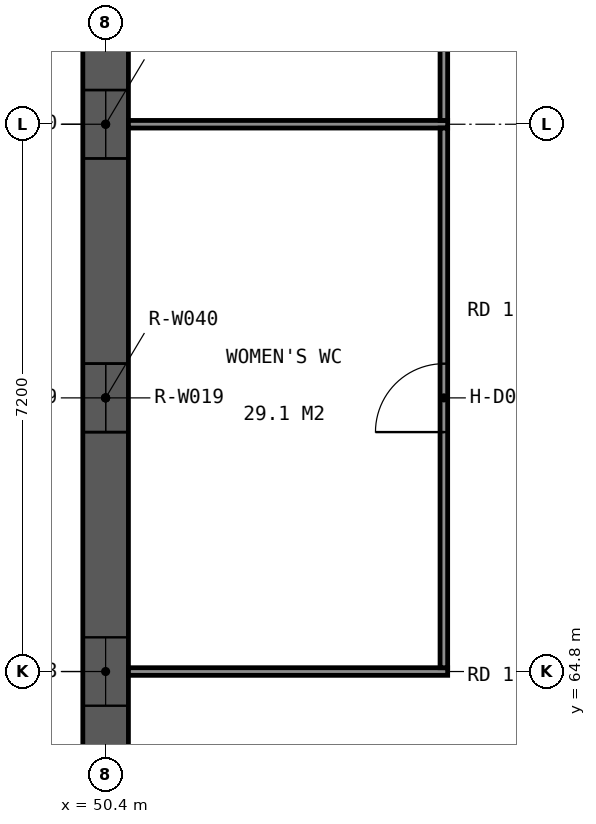
"""IFC4 building model, lengths in metres.
Left out: names, types, materials, properties, quantities, classifications, styles, units other than length and angle.
Written with IfcOpenShell. Run it as: python <this file> out.ifc"""

import sys

from ifc_helpers import new_model, si_unit, direction, frame, frame_2d, origin, place, context, subcontext, project, spatial, polyline, rectangle, outline, extrude, element, fill, save


model = new_model("IFC4")
c1 = context("Model", 3, precision=1e-05, world=origin(), true_north=direction((0.0, 1.0)))
c2 = subcontext(c1, "Body", "Model", "MODEL_VIEW")
j1 = project(units=[si_unit("LENGTHUNIT", "METRE"), si_unit("PLANEANGLEUNIT", "RADIAN")], contexts=[c1])
p1 = place(None, origin())
s1 = spatial("IfcSite", under=j1, at=p1, CompositionType="ELEMENT")
p2 = place(p1, origin())
s2 = spatial("IfcBuilding", under=s1, at=p2, CompositionType="ELEMENT")
p3 = place(p2, frame((0.0, 0.0, 9.6)))
s3 = spatial("IfcBuildingStorey", under=s2, at=p3, CompositionType="ELEMENT", Elevation=9.6)
p4 = place(p3, frame((50.4, 52.2, 0.0), z_axis=(0.0, 0.0, 1.0), x_axis=(0.0, 1.0, 0.0)))
e1 = element("IfcWall", 1, at=p4, inside=s3, PredefinedType="SOLIDWALL", context=c2, shape_type="SweptSolid", body=[
    extrude(outline(polyline([(0.0, 0.0), (54.0, 0.0), (54.0, 6.409), (53.7, 6.509), (53.4, 6.609), (53.1, 6.709), (52.8, 6.809), (52.5, 6.909), (52.2, 7.009), (51.9, 7.109), (51.6, 7.209), (51.3, 7.309), (51.0, 7.409), (50.764, 7.488), (50.762, 7.489), (50.7, 7.509), (50.4, 7.609), (50.1, 7.709), (49.8, 7.809), (49.5, 7.909), (49.2, 8.009), (48.9, 8.109), (48.6, 8.209), (48.3, 8.309), (48.0, 8.409), (47.7, 8.509), (47.4, 8.609), (47.1, 8.709), (46.8, 8.809), (46.5, 8.909), (46.2, 9.009), (46.027, 9.067), (46.025, 9.068), (45.964, 9.088), (45.962, 9.3), (45.9, 9.32), (45.6, 9.42), (45.3, 9.52), (45.0, 9.62), (44.7, 9.72), (44.4, 9.82), (44.1, 9.92), (43.8, 10.02), (43.5, 10.12), (43.2, 10.22), (42.9, 10.32), (42.6, 10.42), (42.3, 10.52), (42.0, 10.62), (41.7, 10.72), (41.4, 10.82), (41.227, 10.878), (41.225, 10.878), (41.1, 10.92), (40.8, 11.02), (40.5, 11.12), (40.2, 11.22), (39.9, 11.32), (39.6, 11.42), (39.3, 11.52), (39.0, 11.62), (38.7, 11.72), (38.4, 11.82), (38.1, 11.92), (37.8, 12.02), (37.5, 12.12), (37.2, 12.22), (36.9, 12.32), (36.6, 12.42), (36.49, 12.457), (36.488, 12.458), (36.427, 12.478), (36.425, 12.689), (36.3, 12.731), (36.0, 12.831), (35.7, 12.931), (35.4, 13.031), (35.1, 13.131), (34.8, 13.231), (34.5, 13.331), (34.2, 13.431), (33.9, 13.531), (33.6, 13.631), (33.3, 13.731), (33.0, 13.831), (32.7, 13.931), (32.4, 14.031), (32.1, 14.131), (31.8, 14.231), (31.69, 14.268), (31.688, 14.268), (31.5, 14.331), (31.2, 14.431), (30.9, 14.531), (30.6, 14.631), (30.3, 14.731), (30.0, 14.831), (29.7, 14.931), (29.4, 15.031), (29.1, 15.131), (28.8, 15.231), (28.5, 15.331), (28.2, 15.431), (27.9, 15.531), (27.6, 15.631), (27.3, 15.731), (27.201, 15.764), (27.199, 15.764), (27.0, 15.764), (26.801, 15.764), (26.799, 15.764), (26.7, 15.731), (26.4, 15.631), (26.1, 15.531), (25.8, 15.431), (25.5, 15.331), (25.2, 15.231), (24.9, 15.131), (24.6, 15.031), (24.3, 14.931), (24.0, 14.831), (23.7, 14.731), (23.4, 14.631), (23.1, 14.531), (22.8, 14.431), (22.5, 14.331), (22.312, 14.268), (22.31, 14.268), (22.2, 14.231), (21.9, 14.131), (21.6, 14.031), (21.3, 13.931), (21.0, 13.831), (20.7, 13.731), (20.4, 13.631), (20.1, 13.531), (19.8, 13.431), (19.5, 13.331), (19.2, 13.231), (18.9, 13.131), (18.6, 13.031), (18.3, 12.931), (18.0, 12.831), (17.7, 12.731), (17.575, 12.689), (17.573, 12.478), (17.512, 12.458), (17.51, 12.457), (17.4, 12.42), (17.1, 12.32), (16.8, 12.22), (16.5, 12.12), (16.2, 12.02), (15.9, 11.92), (15.6, 11.82), (15.3, 11.72), (15.0, 11.62), (14.7, 11.52), (14.4, 11.42), (14.1, 11.32), (13.8, 11.22), (13.5, 11.12), (13.2, 11.02), (12.9, 10.92), (12.775, 10.878), (12.773, 10.878), (12.6, 10.82), (12.3, 10.72), (12.0, 10.62), (11.7, 10.52), (11.4, 10.42), (11.1, 10.32), (10.8, 10.22), (10.5, 10.12), (10.2, 10.02), (9.9, 9.92), (9.6, 9.82), (9.3, 9.72), (9.0, 9.62), (8.7, 9.52), (8.4, 9.42), (8.1, 9.32), (8.038, 9.3), (8.036, 9.088), (7.975, 9.068), (7.973, 9.067), (7.8, 9.009), (7.5, 8.909), (7.2, 8.809), (6.9, 8.709), (6.6, 8.609), (6.3, 8.509), (6.0, 8.409), (5.7, 8.309), (5.4, 8.209), (5.1, 8.109), (4.8, 8.009), (4.5, 7.909), (4.2, 7.809), (3.9, 7.709), (3.6, 7.609), (3.3, 7.509), (3.238, 7.489), (3.236, 7.488), (3.0, 7.409), (2.7, 7.309), (2.4, 7.209), (2.1, 7.109), (1.8, 7.009), (1.5, 6.909), (1.2, 6.809), (0.9, 6.709), (0.6, 6.609), (0.3, 6.509), (0.0, 6.409), (0.0, 0.0)])), frame((0.0, 0.3, 0.0), z_axis=(0.0, -1.0, 0.0), x_axis=(1.0, 0.0, 0.0)), (0.0, 0.0, 1.0), 0.6),
])
p5 = place(p4, frame((1.35, 0.0, 0.9)))
e2 = element("IfcOpeningElement", 2, at=p5, cuts=e1, PredefinedType="OPENING", context=c2, shape_type="SweptSolid", body=[
    extrude(rectangle(XDim=0.9, YDim=3.3, at=frame_2d((0.45, 1.65))), frame((0.0, 0.31, 0.0), z_axis=(0.0, -1.0, 0.0), x_axis=(1.0, 0.0, 0.0)), (0.0, 0.0, 1.0), 0.62),
])
p6 = place(p4, frame((8.55, 0.0, 0.9)))
e3 = element("IfcOpeningElement", 3, at=p6, cuts=e1, PredefinedType="OPENING", context=c2, shape_type="SweptSolid", body=[
    extrude(rectangle(XDim=0.9, YDim=3.3, at=frame_2d((0.45, 1.65))), frame((0.0, 0.31, 0.0), z_axis=(0.0, -1.0, 0.0), x_axis=(1.0, 0.0, 0.0)), (0.0, 0.0, 1.0), 0.62),
])
p7 = place(p4, frame((15.75, 0.0, 0.9)))
e4 = element("IfcOpeningElement", 4, at=p7, cuts=e1, PredefinedType="OPENING", context=c2, shape_type="SweptSolid", body=[
    extrude(rectangle(XDim=0.9, YDim=3.3, at=frame_2d((0.45, 1.65))), frame((0.0, 0.31, 0.0), z_axis=(0.0, -1.0, 0.0), x_axis=(1.0, 0.0, 0.0)), (0.0, 0.0, 1.0), 0.62),
])
p8 = place(p4, frame((22.95, 0.0, 0.9)))
e5 = element("IfcOpeningElement", 5, at=p8, cuts=e1, PredefinedType="OPENING", context=c2, shape_type="SweptSolid", body=[
    extrude(rectangle(XDim=0.9, YDim=3.3, at=frame_2d((0.45, 1.65))), frame((0.0, 0.31, 0.0), z_axis=(0.0, -1.0, 0.0), x_axis=(1.0, 0.0, 0.0)), (0.0, 0.0, 1.0), 0.62),
])
p9 = place(p4, frame((30.15, 0.0, 0.9)))
e6 = element("IfcOpeningElement", 6, at=p9, cuts=e1, PredefinedType="OPENING", context=c2, shape_type="SweptSolid", body=[
    extrude(rectangle(XDim=0.9, YDim=3.3, at=frame_2d((0.45, 1.65))), frame((0.0, 0.31, 0.0), z_axis=(0.0, -1.0, 0.0), x_axis=(1.0, 0.0, 0.0)), (0.0, 0.0, 1.0), 0.62),
])
p10 = place(p4, frame((37.35, 0.0, 0.9)))
e7 = element("IfcOpeningElement", 7, at=p10, cuts=e1, PredefinedType="OPENING", context=c2, shape_type="SweptSolid", body=[
    extrude(rectangle(XDim=0.9, YDim=3.3, at=frame_2d((0.45, 1.65))), frame((0.0, 0.31, 0.0), z_axis=(0.0, -1.0, 0.0), x_axis=(1.0, 0.0, 0.0)), (0.0, 0.0, 1.0), 0.62),
])
p11 = place(p4, frame((44.55, 0.0, 0.9)))
e8 = element("IfcOpeningElement", 8, at=p11, cuts=e1, PredefinedType="OPENING", context=c2, shape_type="SweptSolid", body=[
    extrude(rectangle(XDim=0.9, YDim=3.3, at=frame_2d((0.45, 1.65))), frame((0.0, 0.31, 0.0), z_axis=(0.0, -1.0, 0.0), x_axis=(1.0, 0.0, 0.0)), (0.0, 0.0, 1.0), 0.62),
])
p12 = place(p4, frame((51.75, 0.0, 0.9)))
e9 = element("IfcOpeningElement", 9, at=p12, cuts=e1, PredefinedType="OPENING", context=c2, shape_type="SweptSolid", body=[
    extrude(rectangle(XDim=0.9, YDim=3.3, at=frame_2d((0.45, 1.65))), frame((0.0, 0.31, 0.0), z_axis=(0.0, -1.0, 0.0), x_axis=(1.0, 0.0, 0.0)), (0.0, 0.0, 1.0), 0.62),
])
p13 = place(p4, frame((1.35, 0.0, 4.8)))
e10 = element("IfcOpeningElement", 10, at=p13, cuts=e1, PredefinedType="OPENING", context=c2, shape_type="SweptSolid", body=[
    extrude(rectangle(XDim=0.9, YDim=1.5, at=frame_2d((0.45, 0.75))), frame((0.0, 0.31, 0.0), z_axis=(0.0, -1.0, 0.0), x_axis=(1.0, 0.0, 0.0)), (0.0, 0.0, 1.0), 0.62),
])
p14 = place(p4, frame((4.95, 0.0, 4.8)))
e11 = element("IfcOpeningElement", 11, at=p14, cuts=e1, PredefinedType="OPENING", context=c2, shape_type="SweptSolid", body=[
    extrude(rectangle(XDim=0.9, YDim=2.4, at=frame_2d((0.45, 1.2))), frame((0.0, 0.31, 0.0), z_axis=(0.0, -1.0, 0.0), x_axis=(1.0, 0.0, 0.0)), (0.0, 0.0, 1.0), 0.62),
])
p15 = place(p4, frame((8.55, 0.0, 4.8)))
e12 = element("IfcOpeningElement", 12, at=p15, cuts=e1, PredefinedType="OPENING", context=c2, shape_type="SweptSolid", body=[
    extrude(rectangle(XDim=0.9, YDim=3.3, at=frame_2d((0.45, 1.65))), frame((0.0, 0.31, 0.0), z_axis=(0.0, -1.0, 0.0), x_axis=(1.0, 0.0, 0.0)), (0.0, 0.0, 1.0), 0.62),
])
p16 = place(p4, frame((12.15, 0.0, 4.8)))
e13 = element("IfcOpeningElement", 13, at=p16, cuts=e1, PredefinedType="OPENING", context=c2, shape_type="SweptSolid", body=[
    extrude(rectangle(XDim=0.9, YDim=4.2, at=frame_2d((0.45, 2.1))), frame((0.0, 0.31, 0.0), z_axis=(0.0, -1.0, 0.0), x_axis=(1.0, 0.0, 0.0)), (0.0, 0.0, 1.0), 0.62),
])
p17 = place(p4, frame((15.75, 0.0, 4.8)))
e14 = element("IfcOpeningElement", 14, at=p17, cuts=e1, PredefinedType="OPENING", context=c2, shape_type="SweptSolid", body=[
    extrude(rectangle(XDim=0.9, YDim=4.2, at=frame_2d((0.45, 2.1))), frame((0.0, 0.31, 0.0), z_axis=(0.0, -1.0, 0.0), x_axis=(1.0, 0.0, 0.0)), (0.0, 0.0, 1.0), 0.62),
])
p18 = place(p4, frame((19.35, 0.0, 4.8)))
e15 = element("IfcOpeningElement", 15, at=p18, cuts=e1, PredefinedType="OPENING", context=c2, shape_type="SweptSolid", body=[
    extrude(rectangle(XDim=0.9, YDim=4.2, at=frame_2d((0.45, 2.1))), frame((0.0, 0.31, 0.0), z_axis=(0.0, -1.0, 0.0), x_axis=(1.0, 0.0, 0.0)), (0.0, 0.0, 1.0), 0.62),
])
p19 = place(p4, frame((22.95, 0.0, 4.8)))
e16 = element("IfcOpeningElement", 16, at=p19, cuts=e1, PredefinedType="OPENING", context=c2, shape_type="SweptSolid", body=[
    extrude(rectangle(XDim=0.9, YDim=4.2, at=frame_2d((0.45, 2.1))), frame((0.0, 0.31, 0.0), z_axis=(0.0, -1.0, 0.0), x_axis=(1.0, 0.0, 0.0)), (0.0, 0.0, 1.0), 0.62),
])
p20 = place(p4, frame((26.55, 0.0, 4.8)))
e17 = element("IfcOpeningElement", 17, at=p20, cuts=e1, PredefinedType="OPENING", context=c2, shape_type="SweptSolid", body=[
    extrude(rectangle(XDim=0.9, YDim=4.2, at=frame_2d((0.45, 2.1))), frame((0.0, 0.31, 0.0), z_axis=(0.0, -1.0, 0.0), x_axis=(1.0, 0.0, 0.0)), (0.0, 0.0, 1.0), 0.62),
])
p21 = place(p4, frame((30.15, 0.0, 4.8)))
e18 = element("IfcOpeningElement", 18, at=p21, cuts=e1, PredefinedType="OPENING", context=c2, shape_type="SweptSolid", body=[
    extrude(rectangle(XDim=0.9, YDim=4.2, at=frame_2d((0.45, 2.1))), frame((0.0, 0.31, 0.0), z_axis=(0.0, -1.0, 0.0), x_axis=(1.0, 0.0, 0.0)), (0.0, 0.0, 1.0), 0.62),
])
p22 = place(p4, frame((33.75, 0.0, 4.8)))
e19 = element("IfcOpeningElement", 19, at=p22, cuts=e1, PredefinedType="OPENING", context=c2, shape_type="SweptSolid", body=[
    extrude(rectangle(XDim=0.9, YDim=4.2, at=frame_2d((0.45, 2.1))), frame((0.0, 0.31, 0.0), z_axis=(0.0, -1.0, 0.0), x_axis=(1.0, 0.0, 0.0)), (0.0, 0.0, 1.0), 0.62),
])
p23 = place(p4, frame((37.35, 0.0, 4.8)))
e20 = element("IfcOpeningElement", 20, at=p23, cuts=e1, PredefinedType="OPENING", context=c2, shape_type="SweptSolid", body=[
    extrude(rectangle(XDim=0.9, YDim=4.2, at=frame_2d((0.45, 2.1))), frame((0.0, 0.31, 0.0), z_axis=(0.0, -1.0, 0.0), x_axis=(1.0, 0.0, 0.0)), (0.0, 0.0, 1.0), 0.62),
])
p24 = place(p4, frame((40.95, 0.0, 4.8)))
e21 = element("IfcOpeningElement", 21, at=p24, cuts=e1, PredefinedType="OPENING", context=c2, shape_type="SweptSolid", body=[
    extrude(rectangle(XDim=0.9, YDim=4.2, at=frame_2d((0.45, 2.1))), frame((0.0, 0.31, 0.0), z_axis=(0.0, -1.0, 0.0), x_axis=(1.0, 0.0, 0.0)), (0.0, 0.0, 1.0), 0.62),
])
p25 = place(p4, frame((44.55, 0.0, 4.8)))
e22 = element("IfcOpeningElement", 22, at=p25, cuts=e1, PredefinedType="OPENING", context=c2, shape_type="SweptSolid", body=[
    extrude(rectangle(XDim=0.9, YDim=3.3, at=frame_2d((0.45, 1.65))), frame((0.0, 0.31, 0.0), z_axis=(0.0, -1.0, 0.0), x_axis=(1.0, 0.0, 0.0)), (0.0, 0.0, 1.0), 0.62),
])
p26 = place(p4, frame((48.15, 0.0, 4.8)))
e23 = element("IfcOpeningElement", 23, at=p26, cuts=e1, PredefinedType="OPENING", context=c2, shape_type="SweptSolid", body=[
    extrude(rectangle(XDim=0.9, YDim=2.4, at=frame_2d((0.45, 1.2))), frame((0.0, 0.31, 0.0), z_axis=(0.0, -1.0, 0.0), x_axis=(1.0, 0.0, 0.0)), (0.0, 0.0, 1.0), 0.62),
])
p27 = place(p4, frame((51.75, 0.0, 4.8)))
e24 = element("IfcOpeningElement", 24, at=p27, cuts=e1, PredefinedType="OPENING", context=c2, shape_type="SweptSolid", body=[
    extrude(rectangle(XDim=0.9, YDim=1.5, at=frame_2d((0.45, 0.75))), frame((0.0, 0.31, 0.0), z_axis=(0.0, -1.0, 0.0), x_axis=(1.0, 0.0, 0.0)), (0.0, 0.0, 1.0), 0.62),
])
p28 = place(p4, frame((15.75, 0.0, 9.6)))
e25 = element("IfcOpeningElement", 25, at=p28, cuts=e1, PredefinedType="OPENING", context=c2, shape_type="SweptSolid", body=[
    extrude(rectangle(XDim=0.9, YDim=1.5, at=frame_2d((0.45, 0.75))), frame((0.0, 0.31, 0.0), z_axis=(0.0, -1.0, 0.0), x_axis=(1.0, 0.0, 0.0)), (0.0, 0.0, 1.0), 0.62),
])
p29 = place(p4, frame((19.35, 0.0, 9.6)))
e26 = element("IfcOpeningElement", 26, at=p29, cuts=e1, PredefinedType="OPENING", context=c2, shape_type="SweptSolid", body=[
    extrude(rectangle(XDim=0.9, YDim=2.4, at=frame_2d((0.45, 1.2))), frame((0.0, 0.31, 0.0), z_axis=(0.0, -1.0, 0.0), x_axis=(1.0, 0.0, 0.0)), (0.0, 0.0, 1.0), 0.62),
])
p30 = place(p4, frame((22.95, 0.0, 9.6)))
e27 = element("IfcOpeningElement", 27, at=p30, cuts=e1, PredefinedType="OPENING", context=c2, shape_type="SweptSolid", body=[
    extrude(rectangle(XDim=0.9, YDim=4.2, at=frame_2d((0.45, 2.1))), frame((0.0, 0.31, 0.0), z_axis=(0.0, -1.0, 0.0), x_axis=(1.0, 0.0, 0.0)), (0.0, 0.0, 1.0), 0.62),
])
p31 = place(p4, frame((26.55, 0.0, 9.6)))
e28 = element("IfcOpeningElement", 28, at=p31, cuts=e1, PredefinedType="OPENING", context=c2, shape_type="SweptSolid", body=[
    extrude(rectangle(XDim=0.9, YDim=4.2, at=frame_2d((0.45, 2.1))), frame((0.0, 0.31, 0.0), z_axis=(0.0, -1.0, 0.0), x_axis=(1.0, 0.0, 0.0)), (0.0, 0.0, 1.0), 0.62),
])
p32 = place(p4, frame((30.15, 0.0, 9.6)))
e29 = element("IfcOpeningElement", 29, at=p32, cuts=e1, PredefinedType="OPENING", context=c2, shape_type="SweptSolid", body=[
    extrude(rectangle(XDim=0.9, YDim=4.2, at=frame_2d((0.45, 2.1))), frame((0.0, 0.31, 0.0), z_axis=(0.0, -1.0, 0.0), x_axis=(1.0, 0.0, 0.0)), (0.0, 0.0, 1.0), 0.62),
])
p33 = place(p4, frame((33.75, 0.0, 9.6)))
e30 = element("IfcOpeningElement", 30, at=p33, cuts=e1, PredefinedType="OPENING", context=c2, shape_type="SweptSolid", body=[
    extrude(rectangle(XDim=0.9, YDim=2.4, at=frame_2d((0.45, 1.2))), frame((0.0, 0.31, 0.0), z_axis=(0.0, -1.0, 0.0), x_axis=(1.0, 0.0, 0.0)), (0.0, 0.0, 1.0), 0.62),
])
p34 = place(p4, frame((37.35, 0.0, 9.6)))
e31 = element("IfcOpeningElement", 31, at=p34, cuts=e1, PredefinedType="OPENING", context=c2, shape_type="SweptSolid", body=[
    extrude(rectangle(XDim=0.9, YDim=1.5, at=frame_2d((0.45, 0.75))), frame((0.0, 0.31, 0.0), z_axis=(0.0, -1.0, 0.0), x_axis=(1.0, 0.0, 0.0)), (0.0, 0.0, 1.0), 0.62),
])
for number, where, z_axis, x_axis in (
    (32, (50.7, 64.8, 0.0), (0.0, 0.0, 1.0), (1.0, 0.0, 0.0)),
    (33, (50.7, 72.0, 0.0), (0.0, 0.0, 1.0), (1.0, 0.0, 0.0)),
):
    element("IfcWall", number, at=place(p3, frame(where, z_axis=z_axis, x_axis=x_axis)), inside=s3, PredefinedType="PARTITIONING", context=c2, shape_type="SweptSolid", body=[
        extrude(rectangle(XDim=4.2, YDim=0.1, at=frame_2d((2.1, 0.0))), origin(), (0.0, 0.0, 1.0), 4.7),
    ])
p35 = place(p3, frame((54.85, 64.85, 0.0), z_axis=(0.0, 0.0, 1.0), x_axis=(0.0, 1.0, 0.0)))
e34 = element("IfcWall", 34, at=p35, inside=s3, PredefinedType="PARTITIONING", context=c2, shape_type="SweptSolid", body=[
    extrude(rectangle(XDim=7.1, YDim=0.1, at=frame_2d((3.55, 0.0))), origin(), (0.0, 0.0, 1.0), 4.7),
])
p36 = place(p35, frame((3.1, 0.0, 0.0)))
e35 = element("IfcOpeningElement", 35, at=p36, cuts=e34, PredefinedType="OPENING", context=c2, shape_type="SweptSolid", body=[
    extrude(rectangle(XDim=0.9, YDim=2.1, at=frame_2d((0.45, 1.05))), frame((0.0, 0.06, 0.0), z_axis=(0.0, -1.0, 0.0), x_axis=(1.0, 0.0, 0.0)), (0.0, 0.0, 1.0), 0.12),
])
p37 = place(p3, frame((54.85, 72.05, 0.0), z_axis=(0.0, 0.0, 1.0), x_axis=(0.0, 1.0, 0.0)))
e36 = element("IfcWall", 36, at=p37, inside=s3, PredefinedType="PARTITIONING", context=c2, shape_type="SweptSolid", body=[
    extrude(rectangle(XDim=7.1, YDim=0.1, at=frame_2d((3.55, 0.0))), origin(), (0.0, 0.0, 1.0), 4.7),
])
p38 = place(p37, frame((3.1, 0.0, 0.0)))
e37 = element("IfcOpeningElement", 37, at=p38, cuts=e36, PredefinedType="OPENING", context=c2, shape_type="SweptSolid", body=[
    extrude(rectangle(XDim=0.9, YDim=2.1, at=frame_2d((0.45, 1.05))), frame((0.0, 0.06, 0.0), z_axis=(0.0, -1.0, 0.0), x_axis=(1.0, 0.0, 0.0)), (0.0, 0.0, 1.0), 0.12),
])
p39 = place(p7, origin())
e38 = element("IfcWindow", 38, at=p39, inside=s3, PartitioningType="SINGLE_PANEL", PredefinedType="WINDOW", context=c2, shape_type="SweptSolid", body=[
    extrude(rectangle(XDim=0.9, YDim=3.3, at=frame_2d((0.45, 1.65))), frame((0.0, 0.03, 0.0), z_axis=(0.0, -1.0, 0.0), x_axis=(1.0, 0.0, 0.0)), (0.0, 0.0, 1.0), 0.06),
])
fill(e4, e38)
p40 = place(p16, origin())
e39 = element("IfcWindow", 39, at=p40, inside=s3, PartitioningType="SINGLE_PANEL", PredefinedType="WINDOW", context=c2, shape_type="SweptSolid", body=[
    extrude(rectangle(XDim=0.9, YDim=4.2, at=frame_2d((0.45, 2.1))), frame((0.0, 0.03, 0.0), z_axis=(0.0, -1.0, 0.0), x_axis=(1.0, 0.0, 0.0)), (0.0, 0.0, 1.0), 0.06),
])
fill(e13, e39)
p41 = place(p17, origin())
e40 = element("IfcWindow", 40, at=p41, inside=s3, PartitioningType="SINGLE_PANEL", PredefinedType="WINDOW", context=c2, shape_type="SweptSolid", body=[
    extrude(rectangle(XDim=0.9, YDim=4.2, at=frame_2d((0.45, 2.1))), frame((0.0, 0.03, 0.0), z_axis=(0.0, -1.0, 0.0), x_axis=(1.0, 0.0, 0.0)), (0.0, 0.0, 1.0), 0.06),
])
fill(e14, e40)
p42 = place(p18, origin())
e41 = element("IfcWindow", 41, at=p42, inside=s3, PartitioningType="SINGLE_PANEL", PredefinedType="WINDOW", context=c2, shape_type="SweptSolid", body=[
    extrude(rectangle(XDim=0.9, YDim=4.2, at=frame_2d((0.45, 2.1))), frame((0.0, 0.03, 0.0), z_axis=(0.0, -1.0, 0.0), x_axis=(1.0, 0.0, 0.0)), (0.0, 0.0, 1.0), 0.06),
])
fill(e15, e41)
p43 = place(p28, origin())
e42 = element("IfcWindow", 42, at=p43, inside=s3, PartitioningType="SINGLE_PANEL", PredefinedType="WINDOW", context=c2, shape_type="SweptSolid", body=[
    extrude(rectangle(XDim=0.9, YDim=1.5, at=frame_2d((0.45, 0.75))), frame((0.0, 0.03, 0.0), z_axis=(0.0, -1.0, 0.0), x_axis=(1.0, 0.0, 0.0)), (0.0, 0.0, 1.0), 0.06),
])
fill(e25, e42)
p44 = place(p29, origin())
e43 = element("IfcWindow", 43, at=p44, inside=s3, PartitioningType="SINGLE_PANEL", PredefinedType="WINDOW", context=c2, shape_type="SweptSolid", body=[
    extrude(rectangle(XDim=0.9, YDim=2.4, at=frame_2d((0.45, 1.2))), frame((0.0, 0.03, 0.0), z_axis=(0.0, -1.0, 0.0), x_axis=(1.0, 0.0, 0.0)), (0.0, 0.0, 1.0), 0.06),
])
fill(e26, e43)
p45 = place(p36, origin())
e44 = element("IfcDoor", 44, at=p45, inside=s3, OperationType="SINGLE_SWING_LEFT", PredefinedType="DOOR", context=c2, shape_type="SweptSolid", body=[
    extrude(rectangle(XDim=0.9, YDim=2.1, at=frame_2d((0.45, 1.05))), frame((0.0, 0.025, 0.0), z_axis=(0.0, -1.0, 0.0), x_axis=(1.0, 0.0, 0.0)), (0.0, 0.0, 1.0), 0.05),
])
fill(e35, e44)
save(model, sys.argv[1])
